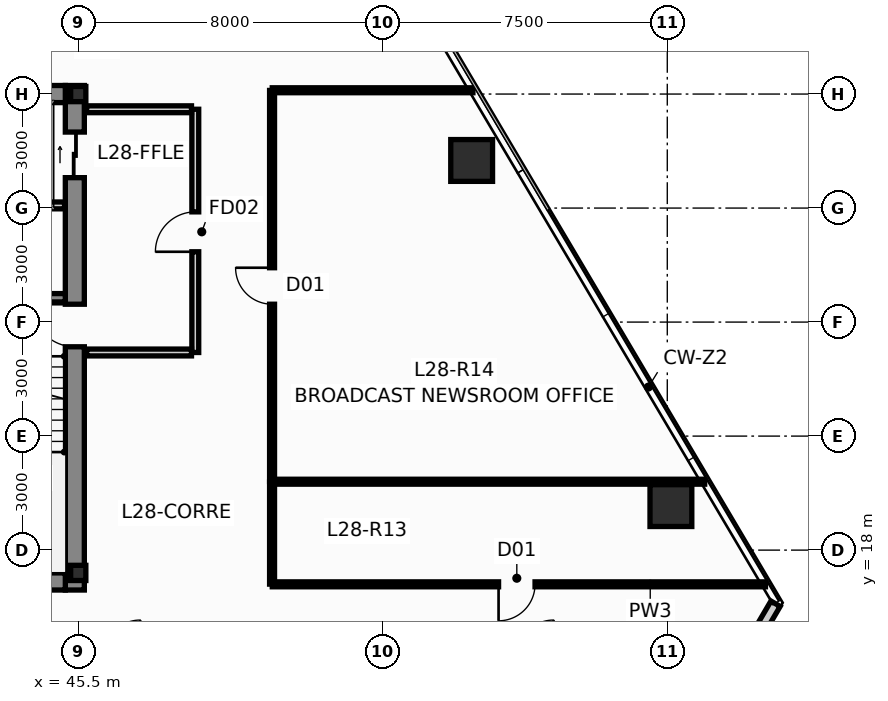
"""IFC4 building model, lengths in metres.
Left out: names, types, materials, properties, quantities, classifications, styles, units other than length and angle.
Written with IfcOpenShell. Run it as: python <this file> out.ifc"""

import sys

from ifc_helpers import new_model, si_unit, direction, frame, frame_2d, origin, origin_2d, place, context, subcontext, project, spatial, rectangle, hollow_rectangle, i_section, extrude, source, transform, mapped, element, fill, save


model = new_model("IFC4")
c1 = context("Model", 3, precision=1e-05, world=origin(), true_north=direction((0.0, 1.0)))
c2 = subcontext(c1, "Body", "Model", "MODEL_VIEW")
j1 = project(units=[si_unit("LENGTHUNIT", "METRE"), si_unit("PLANEANGLEUNIT", "RADIAN")], contexts=[c1])
p1 = place(None, origin())
s1 = spatial("IfcSite", under=j1, at=p1, CompositionType="ELEMENT")
p2 = place(p1, origin())
s2 = spatial("IfcBuilding", under=s1, at=p2, CompositionType="ELEMENT")
p3 = place(p2, frame((0.0, 0.0, 109.05)))
s3 = spatial("IfcBuildingStorey", under=s2, at=p3, CompositionType="ELEMENT", Elevation=109.05)
m1 = source(origin(), c2, "Body", "SweptSolid", [
    extrude(i_section(OverallWidth=0.4, OverallDepth=0.4, WebThickness=0.02, FlangeThickness=0.032, at=origin_2d()), origin(), (0.0, 0.0, 1.0), 3.65),
])
for number, where, z_axis, x_axis in (
    (1, (45.5, 17.4, 0.0), (0.0, 0.0, 1.0), (1.0, 0.0, 0.0)),
    (2, (45.5, 30.0, 0.0), (0.0, 0.0, 1.0), (1.0, 0.0, 0.0)),
):
    element("IfcColumn", number, at=place(p3, frame(where, z_axis=z_axis, x_axis=x_axis)), inside=s3, PredefinedType="COLUMN", context=c2, shape_type="MappedRepresentation", body=[
        mapped(m1, transform((0.0, 0.0, 0.0), scale=1.0)),
    ])
p4 = place(p3, frame((45.41, 16.95, 0.0), z_axis=(0.0, 0.0, 1.0), x_axis=(0.0, 1.0, 0.0)))
e3 = element("IfcWall", 3, at=p4, inside=s3, PredefinedType="SHEAR", context=c2, shape_type="SweptSolid", body=[
    extrude(rectangle(XDim=13.275, YDim=0.5, at=frame_2d((6.638, 0.0))), origin(), (0.0, 0.0, 1.0), 3.65),
])
p5 = place(p4, frame((6.4, 0.0, 0.0)))
e4 = element("IfcOpeningElement", 4, at=p5, cuts=e3, PredefinedType="OPENING", context=c2, shape_type="SweptSolid", body=[
    extrude(rectangle(XDim=1.12, YDim=2.15, at=frame_2d((0.56, 1.075))), frame((0.0, 0.262, 0.0), z_axis=(0.0, -1.0, 0.0), x_axis=(1.0, 0.0, 0.0)), (0.0, 0.0, 1.0), 0.524),
])
p6 = place(p4, frame((10.85, 0.0, 0.0)))
e5 = element("IfcOpeningElement", 5, at=p6, cuts=e3, PredefinedType="OPENING", context=c2, shape_type="SweptSolid", body=[
    extrude(rectangle(XDim=1.2, YDim=2.2, at=frame_2d((0.6, 1.1))), frame((0.0, 0.262, 0.0), z_axis=(0.0, -1.0, 0.0), x_axis=(1.0, 0.0, 0.0)), (0.0, 0.0, 1.0), 0.524),
])
for number, where, z_axis, x_axis in (
    (6, (42.26, 17.175, 0.0), (0.0, 0.0, 1.0), (1.0, 0.0, 0.0)),
    (7, (42.26, 30.0, 0.0), (0.0, 0.0, 1.0), (1.0, 0.0, 0.0)),
):
    element("IfcWall", number, at=place(p3, frame(where, z_axis=z_axis, x_axis=x_axis)), inside=s3, PredefinedType="SHEAR", context=c2, shape_type="SweptSolid", body=[
        extrude(rectangle(XDim=2.9, YDim=0.45, at=frame_2d((1.45, 0.0))), origin(), (0.0, 0.0, 1.0), 3.65),
    ])
p7 = place(p3, frame((42.26, 24.64, 0.0), z_axis=(0.0, 0.0, 1.0), x_axis=(1.0, 0.0, 0.0)))
e8 = element("IfcWall", 8, at=p7, inside=s3, PredefinedType="SHEAR", context=c2, shape_type="SweptSolid", body=[
    extrude(rectangle(XDim=2.9, YDim=0.22, at=frame_2d((1.45, 0.0))), origin(), (0.0, 0.0, 1.0), 3.65),
])
m2 = source(origin(), c2, "Body", "SweptSolid", [
    extrude(hollow_rectangle(XDim=1.1, YDim=1.1, WallThickness=0.06, at=origin_2d()), origin(), (0.0, 0.0, 1.0), 3.651),
])
p8 = place(p3, frame((61.095, 19.171, 0.0), z_axis=(-0.010431780378, -0.021599135014, 0.999712286273), x_axis=(0.900476348161, -0.434904985489, 0.0)))
e9 = element("IfcColumn", 9, at=p8, inside=s3, PredefinedType="COLUMN", context=c2, shape_type="MappedRepresentation", body=[
    mapped(m2, transform((0.0, 0.0, 0.0), scale=1.0)),
])
m3 = source(origin(), c2, "Body", "SweptSolid", [
    extrude(hollow_rectangle(XDim=1.1, YDim=1.1, WallThickness=0.06, at=origin_2d()), origin(), (0.0, 0.0, 1.0), 3.651),
])
p9 = place(p3, frame((55.852, 28.253, 0.0), z_axis=(-0.014913313399, -0.013776424037, 0.999793880369), x_axis=(0.678553674548, -0.734550822447, 0.0)))
e10 = element("IfcColumn", 10, at=p9, inside=s3, PredefinedType="COLUMN", context=c2, shape_type="MappedRepresentation", body=[
    mapped(m3, transform((0.0, 0.0, 0.0), scale=1.0)),
])
p10 = place(p3, frame((63.849, 16.589, 0.0), z_axis=(0.0, 0.0, 1.0), x_axis=(-0.505497625537, -0.862827995939, 0.0)))
e11 = element("IfcWall", 11, at=p10, inside=s3, PredefinedType="STANDARD", context=c2, shape_type="SweptSolid", body=[
    extrude(rectangle(XDim=13.16, YDim=0.28, at=frame_2d((6.58, 0.0))), origin(), (0.0, 0.0, 1.0), 3.4),
])
p11 = place(p10, frame((5.68, 0.0, 0.9)))
e12 = element("IfcOpeningElement", 12, at=p11, cuts=e11, PredefinedType="OPENING", context=c2, shape_type="SweptSolid", body=[
    extrude(rectangle(XDim=1.8, YDim=1.8, at=frame_2d((0.9, 0.9))), frame((0.0, 0.152, 0.0), z_axis=(0.0, -1.0, 0.0), x_axis=(1.0, 0.0, 0.0)), (0.0, 0.0, 1.0), 0.304),
])
p12 = place(p3, frame((48.58, 23.2, 0.0), z_axis=(0.0, 0.0, 1.0), x_axis=(0.0, 1.0, 0.0)))
e13 = element("IfcWall", 13, at=p12, inside=s3, PredefinedType="PARTITIONING", context=c2, shape_type="SweptSolid", body=[
    extrude(rectangle(XDim=6.4, YDim=0.18, at=frame_2d((3.2, 0.0))), origin(), (0.0, 0.0, 1.0), 3.026),
])
p13 = place(p12, frame((2.65, 0.0, 0.0)))
e14 = element("IfcOpeningElement", 14, at=p13, cuts=e13, PredefinedType="OPENING", context=c2, shape_type="SweptSolid", body=[
    extrude(rectangle(XDim=1.05, YDim=2.15, at=frame_2d((0.525, 1.075))), frame((0.0, 0.102, 0.0), z_axis=(0.0, -1.0, 0.0), x_axis=(1.0, 0.0, 0.0)), (0.0, 0.0, 1.0), 0.204),
])
p14 = place(p3, frame((45.72, 23.2, 0.0), z_axis=(0.0, 0.0, 1.0), x_axis=(1.0, 0.0, 0.0)))
e15 = element("IfcWall", 15, at=p14, inside=s3, PredefinedType="PARTITIONING", context=c2, shape_type="SweptSolid", body=[
    extrude(rectangle(XDim=2.76, YDim=0.18, at=frame_2d((1.38, 0.0))), origin(), (0.0, 0.0, 1.0), 3.4),
])
p15 = place(p3, frame((45.72, 29.6, 0.0), z_axis=(0.0, 0.0, 1.0), x_axis=(1.0, 0.0, 0.0)))
e16 = element("IfcWall", 16, at=p15, inside=s3, PredefinedType="PARTITIONING", context=c2, shape_type="SweptSolid", body=[
    extrude(rectangle(XDim=2.76, YDim=0.18, at=frame_2d((1.38, 0.0))), origin(), (0.0, 0.0, 1.0), 2.783),
])
p16 = place(p3, frame((42.24, 27.07, 0.0), z_axis=(0.0, 0.0, 1.0), x_axis=(1.0, 0.0, 0.0)))
e17 = element("IfcWall", 17, at=p16, inside=s3, PredefinedType="PARTITIONING", context=c2, shape_type="SweptSolid", body=[
    extrude(rectangle(XDim=2.9, YDim=0.18, at=frame_2d((1.45, 0.0))), origin(), (0.0, 0.0, 1.0), 3.4),
])
p17 = place(p3, frame((63.582, 17.1, 0.0), z_axis=(0.0, 0.0, 1.0), x_axis=(-1.0, 0.0, 0.0)))
e18 = element("IfcWall", 18, at=p17, inside=s3, PredefinedType="PARTITIONING", context=c2, shape_type="SweptSolid", body=[
    extrude(rectangle(XDim=12.977, YDim=0.13, at=frame_2d((6.489, 0.0))), origin(), (0.0, 0.0, 1.0), 3.4),
])
p18 = place(p17, frame((6.062, 0.0, 0.0)))
e19 = element("IfcOpeningElement", 19, at=p18, cuts=e18, PredefinedType="OPENING", context=c2, shape_type="SweptSolid", body=[
    extrude(rectangle(XDim=0.96, YDim=2.15, at=frame_2d((0.48, 1.075))), frame((0.0, 0.077, 0.0), z_axis=(0.0, -1.0, 0.0), x_axis=(1.0, 0.0, 0.0)), (0.0, 0.0, 1.0), 0.154),
])
p19 = place(p3, frame((50.605, 19.8, 0.0), z_axis=(0.0, 0.0, 1.0), x_axis=(1.0, 0.0, 0.0)))
e20 = element("IfcWall", 20, at=p19, inside=s3, PredefinedType="PARTITIONING", context=c2, shape_type="SweptSolid", body=[
    extrude(rectangle(XDim=11.379, YDim=0.13, at=frame_2d((5.689, 0.0))), origin(), (0.0, 0.0, 1.0), 3.4),
])
p20 = place(p3, frame((50.6, 19.805, 0.0), z_axis=(0.0, 0.0, 1.0), x_axis=(0.0, 1.0, 0.0)))
e21 = element("IfcWall", 21, at=p20, inside=s3, PredefinedType="PARTITIONING", context=c2, shape_type="SweptSolid", body=[
    extrude(rectangle(XDim=10.29, YDim=0.13, at=frame_2d((5.145, 0.0))), origin(), (0.0, 0.0, 1.0), 3.026),
])
p21 = place(p20, frame((4.665, 0.0, 0.0)))
e22 = element("IfcOpeningElement", 22, at=p21, cuts=e21, PredefinedType="OPENING", context=c2, shape_type="SweptSolid", body=[
    extrude(rectangle(XDim=0.96, YDim=2.15, at=frame_2d((0.48, 1.075))), frame((0.0, 0.077, 0.0), z_axis=(0.0, -1.0, 0.0), x_axis=(1.0, 0.0, 0.0)), (0.0, 0.0, 1.0), 0.154),
])
p22 = place(p3, frame((50.605, 30.1, 0.0), z_axis=(0.0, 0.0, 1.0), x_axis=(1.0, 0.0, 0.0)))
e23 = element("IfcWall", 23, at=p22, inside=s3, PredefinedType="PARTITIONING", context=c2, shape_type="SweptSolid", body=[
    extrude(rectangle(XDim=5.281, YDim=0.13, at=frame_2d((2.64, 0.0))), origin(), (0.0, 0.0, 1.0), 3.4),
])
p23 = place(p3, frame((50.6, 17.105, 0.0), z_axis=(0.0, 0.0, 1.0), x_axis=(0.0, 1.0, 0.0)))
e24 = element("IfcWall", 24, at=p23, inside=s3, PredefinedType="PARTITIONING", context=c2, shape_type="SweptSolid", body=[
    extrude(rectangle(XDim=2.69, YDim=0.13, at=frame_2d((1.345, 0.0))), origin(), (0.0, 0.0, 1.0), 3.026),
])
p24 = place(p5, origin())
e25 = element("IfcDoor", 25, at=p24, inside=s3, OperationType="SINGLE_SWING_RIGHT", PredefinedType="DOOR", context=c2, shape_type="SweptSolid", body=[
    extrude(rectangle(XDim=1.12, YDim=2.15, at=frame_2d((0.56, 1.075))), frame((0.0, 0.025, 0.0), z_axis=(0.0, -1.0, 0.0), x_axis=(1.0, 0.0, 0.0)), (0.0, 0.0, 1.0), 0.05),
])
fill(e4, e25)
p25 = place(p6, origin())
e26 = element("IfcDoor", 26, at=p25, inside=s3, OperationType="SLIDING_TO_RIGHT", PredefinedType="DOOR", context=c2, shape_type="SweptSolid", body=[
    extrude(rectangle(XDim=1.2, YDim=2.2, at=frame_2d((0.6, 1.1))), frame((0.0, 0.025, 0.0), z_axis=(0.0, -1.0, 0.0), x_axis=(1.0, 0.0, 0.0)), (0.0, 0.0, 1.0), 0.05),
])
fill(e5, e26)
p26 = place(p13, origin())
e27 = element("IfcDoor", 27, at=p26, inside=s3, OperationType="SINGLE_SWING_LEFT", PredefinedType="DOOR", context=c2, shape_type="SweptSolid", body=[
    extrude(rectangle(XDim=1.05, YDim=2.15, at=frame_2d((0.525, 1.075))), frame((0.0, 0.025, 0.0), z_axis=(0.0, -1.0, 0.0), x_axis=(1.0, 0.0, 0.0)), (0.0, 0.0, 1.0), 0.05),
])
fill(e14, e27)
p27 = place(p18, origin())
e28 = element("IfcDoor", 28, at=p27, inside=s3, OperationType="SINGLE_SWING_RIGHT", PredefinedType="DOOR", context=c2, shape_type="SweptSolid", body=[
    extrude(rectangle(XDim=0.96, YDim=2.15, at=frame_2d((0.48, 1.075))), frame((0.0, 0.025, 0.0), z_axis=(0.0, -1.0, 0.0), x_axis=(1.0, 0.0, 0.0)), (0.0, 0.0, 1.0), 0.05),
])
fill(e19, e28)
p28 = place(p21, origin())
e29 = element("IfcDoor", 29, at=p28, inside=s3, OperationType="SINGLE_SWING_RIGHT", PredefinedType="DOOR", context=c2, shape_type="SweptSolid", body=[
    extrude(rectangle(XDim=0.96, YDim=2.15, at=frame_2d((0.48, 1.075))), frame((0.0, 0.025, 0.0), z_axis=(0.0, -1.0, 0.0), x_axis=(1.0, 0.0, 0.0)), (0.0, 0.0, 1.0), 0.05),
])
fill(e22, e29)
save(model, sys.argv[1])
